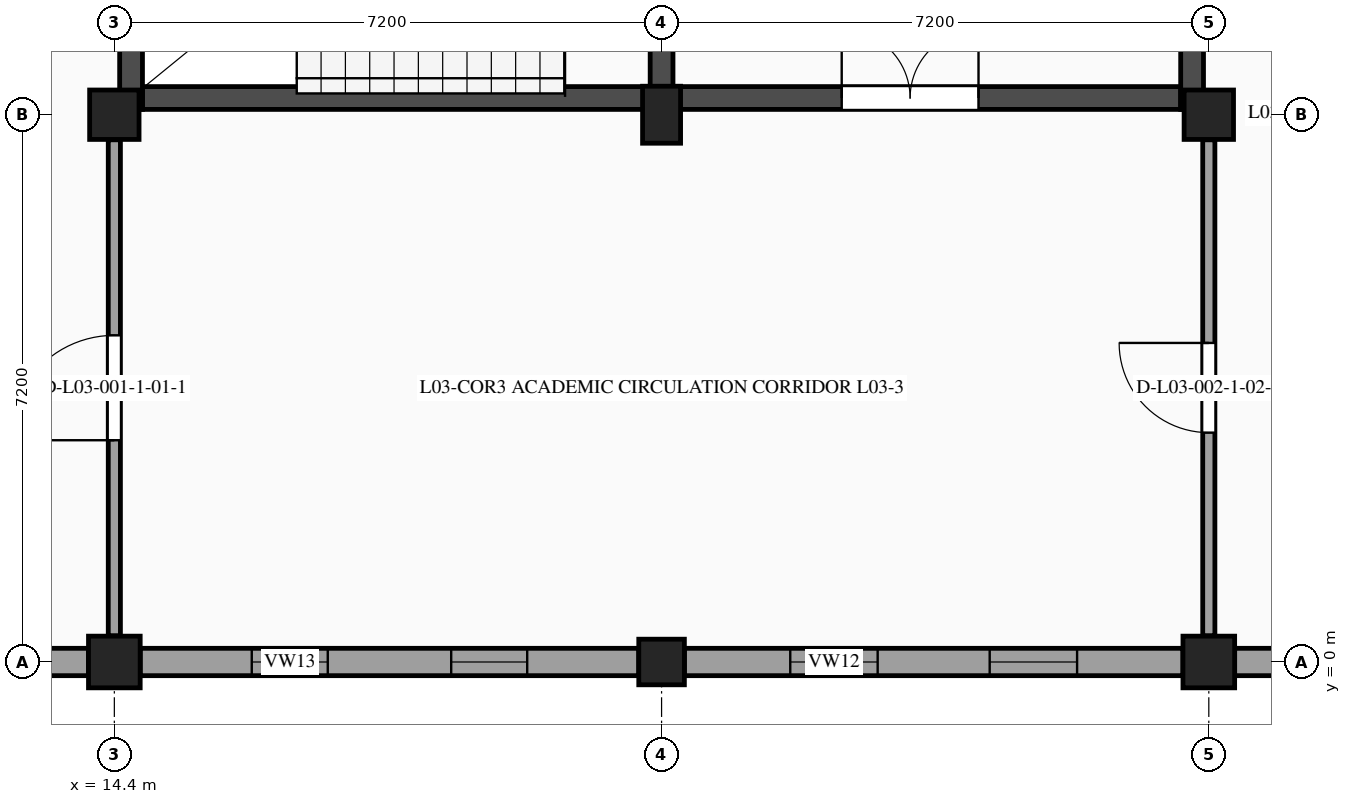
"""IFC4 building model, lengths in metres.
Left out: names, types, materials, properties, quantities, classifications, styles, units other than length and angle.
Written with IfcOpenShell. Run it as: python <this file> out.ifc"""

import sys

from ifc_helpers import new_model, si_unit, direction, frame, frame_2d, origin, origin_2d, place, context, subcontext, project, spatial, rectangle, extrude, element, fill, save


model = new_model("IFC4")
c1 = context("Model", 3, precision=1e-05, world=origin(), true_north=direction((0.0, 1.0)))
c2 = subcontext(c1, "Body", "Model", "MODEL_VIEW")
j1 = project(units=[si_unit("LENGTHUNIT", "METRE"), si_unit("PLANEANGLEUNIT", "RADIAN")], contexts=[c1])
p1 = place(None, origin())
s1 = spatial("IfcSite", under=j1, at=p1, CompositionType="ELEMENT")
p2 = place(p1, origin())
s2 = spatial("IfcBuilding", under=s1, at=p2, CompositionType="ELEMENT")
p3 = place(p2, frame((0.0, 0.0, 14.4)))
s3 = spatial("IfcBuildingStorey", under=s2, at=p3, CompositionType="ELEMENT", Elevation=14.4)
p4 = place(p3, frame((14.4, 0.0, 0.0), z_axis=(0.0, 0.0, 1.0), x_axis=(1.0, 0.0, 0.0)))
e1 = element("IfcColumn", 1, at=p4, inside=s3, PredefinedType="COLUMN", context=c2, shape_type="SweptSolid", body=[
    extrude(rectangle(XDim=0.68, YDim=0.68, at=origin_2d()), origin(), (0.0, 0.0, 1.0), 4.2),
])
p5 = place(p3, frame((14.4, 7.2, 0.0), z_axis=(0.0, 0.0, 1.0), x_axis=(1.0, 0.0, 0.0)))
e2 = element("IfcColumn", 2, at=p5, inside=s3, PredefinedType="COLUMN", context=c2, shape_type="SweptSolid", body=[
    extrude(rectangle(XDim=0.65, YDim=0.65, at=origin_2d()), origin(), (0.0, 0.0, 1.0), 4.2),
])
p6 = place(p3, frame((21.6, 0.0, 0.0), z_axis=(0.0, 0.0, 1.0), x_axis=(1.0, 0.0, 0.0)))
e3 = element("IfcColumn", 3, at=p6, inside=s3, PredefinedType="COLUMN", context=c2, shape_type="SweptSolid", body=[
    extrude(rectangle(XDim=0.6, YDim=0.6, at=origin_2d()), origin(), (0.0, 0.0, 1.0), 4.2),
])
p7 = place(p3, frame((21.6, 7.2, 0.0), z_axis=(0.0, 0.0, 1.0), x_axis=(1.0, 0.0, 0.0)))
e4 = element("IfcColumn", 4, at=p7, inside=s3, PredefinedType="COLUMN", context=c2, shape_type="SweptSolid", body=[
    extrude(rectangle(XDim=0.5, YDim=0.75, at=origin_2d()), origin(), (0.0, 0.0, 1.0), 4.2),
])
p8 = place(p3, frame((28.8, 0.0, 0.0), z_axis=(0.0, 0.0, 1.0), x_axis=(1.0, 0.0, 0.0)))
e5 = element("IfcColumn", 5, at=p8, inside=s3, PredefinedType="COLUMN", context=c2, shape_type="SweptSolid", body=[
    extrude(rectangle(XDim=0.68, YDim=0.68, at=origin_2d()), origin(), (0.0, 0.0, 1.0), 4.2),
])
p9 = place(p3, frame((28.8, 7.2, 0.0), z_axis=(0.0, 0.0, 1.0), x_axis=(1.0, 0.0, 0.0)))
e6 = element("IfcColumn", 6, at=p9, inside=s3, PredefinedType="COLUMN", context=c2, shape_type="SweptSolid", body=[
    extrude(rectangle(XDim=0.65, YDim=0.65, at=origin_2d()), origin(), (0.0, 0.0, 1.0), 4.2),
])
p10 = place(p3, frame((35.7, 0.0, 0.0), z_axis=(0.0, 0.0, 1.0), x_axis=(-1.0, 0.0, 0.0)))
e7 = element("IfcWall", 7, at=p10, inside=s3, PredefinedType="STANDARD", context=c2, shape_type="SweptSolid", body=[
    extrude(rectangle(XDim=6.56, YDim=0.36, at=frame_2d((3.28, 0.0))), origin(), (0.0, 0.0, 1.0), 3.185),
])
p11 = place(p10, frame((1.343, 0.0, 1.15)))
e8 = element("IfcOpeningElement", 8, at=p11, cuts=e7, PredefinedType="OPENING", context=c2, shape_type="SweptSolid", body=[
    extrude(rectangle(XDim=1.25, YDim=1.25, at=frame_2d((0.625, 0.625))), frame((0.0, 0.19, 0.0), z_axis=(0.0, -1.0, 0.0), x_axis=(1.0, 0.0, 0.0)), (0.0, 0.0, 1.0), 0.38),
])
p12 = place(p10, frame((3.967, 0.0, 1.15)))
e9 = element("IfcOpeningElement", 9, at=p12, cuts=e7, PredefinedType="OPENING", context=c2, shape_type="SweptSolid", body=[
    extrude(rectangle(XDim=1.25, YDim=1.25, at=frame_2d((0.625, 0.625))), frame((0.0, 0.19, 0.0), z_axis=(0.0, -1.0, 0.0), x_axis=(1.0, 0.0, 0.0)), (0.0, 0.0, 1.0), 0.38),
])
p13 = place(p3, frame((28.46, 0.0, 0.0), z_axis=(0.0, 0.0, 1.0), x_axis=(-1.0, 0.0, 0.0)))
e10 = element("IfcWall", 10, at=p13, inside=s3, PredefinedType="STANDARD", context=c2, shape_type="SweptSolid", body=[
    extrude(rectangle(XDim=6.56, YDim=0.36, at=frame_2d((3.28, 0.0))), origin(), (0.0, 0.0, 1.0), 3.185),
])
p14 = place(p13, frame((1.393, 0.0, 1.15)))
e11 = element("IfcOpeningElement", 11, at=p14, cuts=e10, PredefinedType="OPENING", context=c2, shape_type="SweptSolid", body=[
    extrude(rectangle(XDim=1.15, YDim=1.2, at=frame_2d((0.575, 0.6))), frame((0.0, 0.19, 0.0), z_axis=(0.0, -1.0, 0.0), x_axis=(1.0, 0.0, 0.0)), (0.0, 0.0, 1.0), 0.38),
])
p15 = place(p13, frame((4.017, 0.0, 1.15)))
e12 = element("IfcOpeningElement", 12, at=p15, cuts=e10, PredefinedType="OPENING", context=c2, shape_type="SweptSolid", body=[
    extrude(rectangle(XDim=1.15, YDim=1.2, at=frame_2d((0.575, 0.6))), frame((0.0, 0.19, 0.0), z_axis=(0.0, -1.0, 0.0), x_axis=(1.0, 0.0, 0.0)), (0.0, 0.0, 1.0), 0.38),
])
p16 = place(p3, frame((21.3, 0.0, 0.0), z_axis=(0.0, 0.0, 1.0), x_axis=(-1.0, 0.0, 0.0)))
e13 = element("IfcWall", 13, at=p16, inside=s3, PredefinedType="STANDARD", context=c2, shape_type="SweptSolid", body=[
    extrude(rectangle(XDim=6.56, YDim=0.36, at=frame_2d((3.28, 0.0))), origin(), (0.0, 0.0, 1.0), 3.185),
])
p17 = place(p16, frame((1.468, 0.0, 1.15)))
e14 = element("IfcOpeningElement", 14, at=p17, cuts=e13, PredefinedType="OPENING", context=c2, shape_type="SweptSolid", body=[
    extrude(rectangle(XDim=1.0, YDim=1.2, at=frame_2d((0.5, 0.6))), frame((0.0, 0.19, 0.0), z_axis=(0.0, -1.0, 0.0), x_axis=(1.0, 0.0, 0.0)), (0.0, 0.0, 1.0), 0.38),
])
p18 = place(p16, frame((4.092, 0.0, 1.15)))
e15 = element("IfcOpeningElement", 15, at=p18, cuts=e13, PredefinedType="OPENING", context=c2, shape_type="SweptSolid", body=[
    extrude(rectangle(XDim=1.0, YDim=1.2, at=frame_2d((0.5, 0.6))), frame((0.0, 0.19, 0.0), z_axis=(0.0, -1.0, 0.0), x_axis=(1.0, 0.0, 0.0)), (0.0, 0.0, 1.0), 0.38),
])
p19 = place(p3, frame((14.06, 0.0, 0.0), z_axis=(0.0, 0.0, 1.0), x_axis=(-1.0, 0.0, 0.0)))
e16 = element("IfcWall", 16, at=p19, inside=s3, PredefinedType="STANDARD", context=c2, shape_type="SweptSolid", body=[
    extrude(rectangle(XDim=6.56, YDim=0.36, at=frame_2d((3.28, 0.0))), origin(), (0.0, 0.0, 1.0), 3.185),
])
p20 = place(p19, frame((1.543, 0.0, 1.15)))
e17 = element("IfcOpeningElement", 17, at=p20, cuts=e16, PredefinedType="OPENING", context=c2, shape_type="SweptSolid", body=[
    extrude(rectangle(XDim=0.85, YDim=1.25, at=frame_2d((0.425, 0.625))), frame((0.0, 0.19, 0.0), z_axis=(0.0, -1.0, 0.0), x_axis=(1.0, 0.0, 0.0)), (0.0, 0.0, 1.0), 0.38),
])
p21 = place(p19, frame((4.167, 0.0, 1.15)))
e18 = element("IfcOpeningElement", 18, at=p21, cuts=e16, PredefinedType="OPENING", context=c2, shape_type="SweptSolid", body=[
    extrude(rectangle(XDim=0.85, YDim=1.25, at=frame_2d((0.425, 0.625))), frame((0.0, 0.19, 0.0), z_axis=(0.0, -1.0, 0.0), x_axis=(1.0, 0.0, 0.0)), (0.0, 0.0, 1.0), 0.38),
])
p22 = place(p3, frame((14.77, 7.42, 0.0), z_axis=(0.0, 0.0, 1.0), x_axis=(1.0, 0.0, 0.0)))
e19 = element("IfcWall", 19, at=p22, inside=s3, PredefinedType="SHEAR", context=c2, shape_type="SweptSolid", body=[
    extrude(rectangle(XDim=6.68, YDim=0.3, at=frame_2d((3.34, 0.0))), origin(), (0.0, 0.0, 1.0), 3.94),
])
p23 = place(p3, frame((14.62, 14.33, 0.0), z_axis=(0.0, 0.0, 1.0), x_axis=(0.0, -1.0, 0.0)))
e20 = element("IfcWall", 20, at=p23, inside=s3, PredefinedType="SHEAR", context=c2, shape_type="SweptSolid", body=[
    extrude(rectangle(XDim=7.06, YDim=0.3, at=frame_2d((3.53, 0.0))), origin(), (0.0, 0.0, 1.0), 3.94),
])
p24 = place(p3, frame((21.6, 7.27, 0.0), z_axis=(0.0, 0.0, 1.0), x_axis=(0.0, 1.0, 0.0)))
e21 = element("IfcWall", 21, at=p24, inside=s3, PredefinedType="SHEAR", context=c2, shape_type="SweptSolid", body=[
    extrude(rectangle(XDim=7.06, YDim=0.3, at=frame_2d((3.53, 0.0))), origin(), (0.0, 0.0, 1.0), 3.94),
])
p25 = place(p24, frame((1.4, 0.0, 0.0)))
e22 = element("IfcOpeningElement", 22, at=p25, cuts=e21, PredefinedType="OPENING", context=c2, shape_type="SweptSolid", body=[
    extrude(rectangle(XDim=1.8, YDim=2.2, at=frame_2d((0.9, 1.1))), frame((0.0, 0.16, 0.0), z_axis=(0.0, -1.0, 0.0), x_axis=(1.0, 0.0, 0.0)), (0.0, 0.0, 1.0), 0.32),
])
p26 = place(p3, frame((21.75, 7.42, 0.0), z_axis=(0.0, 0.0, 1.0), x_axis=(1.0, 0.0, 0.0)))
e23 = element("IfcWall", 23, at=p26, inside=s3, PredefinedType="SHEAR", context=c2, shape_type="SweptSolid", body=[
    extrude(rectangle(XDim=6.68, YDim=0.3, at=frame_2d((3.34, 0.0))), origin(), (0.0, 0.0, 1.0), 3.94),
])
p27 = place(p26, frame((2.22, 0.0, 0.0)))
e24 = element("IfcOpeningElement", 24, at=p27, cuts=e23, PredefinedType="OPENING", context=c2, shape_type="SweptSolid", body=[
    extrude(rectangle(XDim=1.8, YDim=2.2, at=frame_2d((0.9, 1.1))), frame((0.0, 0.16, 0.0), z_axis=(0.0, -1.0, 0.0), x_axis=(1.0, 0.0, 0.0)), (0.0, 0.0, 1.0), 0.32),
])
p28 = place(p3, frame((28.58, 7.27, 0.0), z_axis=(0.0, 0.0, 1.0), x_axis=(0.0, 1.0, 0.0)))
e25 = element("IfcWall", 25, at=p28, inside=s3, PredefinedType="SHEAR", context=c2, shape_type="SweptSolid", body=[
    extrude(rectangle(XDim=7.06, YDim=0.3, at=frame_2d((3.53, 0.0))), origin(), (0.0, 0.0, 1.0), 3.94),
])
p29 = place(p3, frame((14.4, 0.345, 0.0), z_axis=(0.0, 0.0, 1.0), x_axis=(0.0, 1.0, 0.0)))
e26 = element("IfcWall", 26, at=p29, inside=s3, PredefinedType="PARTITIONING", context=c2, shape_type="SweptSolid", body=[
    extrude(rectangle(XDim=6.525, YDim=0.16, at=frame_2d((3.263, 0.0))), origin(), (0.0, 0.0, 1.0), 3.25),
])
p30 = place(p29, frame((2.573, 0.0, 0.0)))
e27 = element("IfcOpeningElement", 27, at=p30, cuts=e26, PredefinedType="OPENING", context=c2, shape_type="SweptSolid", body=[
    extrude(rectangle(XDim=1.38, YDim=2.22, at=frame_2d((0.69, 1.11))), frame((0.0, 0.09, 0.0), z_axis=(0.0, -1.0, 0.0), x_axis=(1.0, 0.0, 0.0)), (0.0, 0.0, 1.0), 0.18),
])
p31 = place(p3, frame((28.8, 0.345, 0.0), z_axis=(0.0, 0.0, 1.0), x_axis=(0.0, 1.0, 0.0)))
e28 = element("IfcWall", 28, at=p31, inside=s3, PredefinedType="PARTITIONING", context=c2, shape_type="SweptSolid", body=[
    extrude(rectangle(XDim=6.525, YDim=0.16, at=frame_2d((3.263, 0.0))), origin(), (0.0, 0.0, 1.0), 3.25),
])
p32 = place(p31, frame((2.673, 0.0, 0.0)))
e29 = element("IfcOpeningElement", 29, at=p32, cuts=e28, PredefinedType="OPENING", context=c2, shape_type="SweptSolid", body=[
    extrude(rectangle(XDim=1.18, YDim=2.18, at=frame_2d((0.59, 1.09))), frame((0.0, 0.09, 0.0), z_axis=(0.0, -1.0, 0.0), x_axis=(1.0, 0.0, 0.0)), (0.0, 0.0, 1.0), 0.18),
])
p33 = place(p14, origin())
e30 = element("IfcWindow", 30, at=p33, inside=s3, PartitioningType="SINGLE_PANEL", PredefinedType="WINDOW", context=c2, shape_type="SweptSolid", body=[
    extrude(rectangle(XDim=1.15, YDim=1.2, at=frame_2d((0.575, 0.6))), frame((0.0, -0.08, 0.0), z_axis=(0.0, -1.0, 0.0), x_axis=(1.0, 0.0, 0.0)), (0.0, 0.0, 1.0), 0.06),
])
fill(e11, e30)
p34 = place(p15, origin())
e31 = element("IfcWindow", 31, at=p34, inside=s3, PartitioningType="SINGLE_PANEL", PredefinedType="WINDOW", context=c2, shape_type="SweptSolid", body=[
    extrude(rectangle(XDim=1.15, YDim=1.2, at=frame_2d((0.575, 0.6))), frame((0.0, -0.08, 0.0), z_axis=(0.0, -1.0, 0.0), x_axis=(1.0, 0.0, 0.0)), (0.0, 0.0, 1.0), 0.06),
])
fill(e12, e31)
p35 = place(p17, origin())
e32 = element("IfcWindow", 32, at=p35, inside=s3, PartitioningType="SINGLE_PANEL", PredefinedType="WINDOW", context=c2, shape_type="SweptSolid", body=[
    extrude(rectangle(XDim=1.0, YDim=1.2, at=frame_2d((0.5, 0.6))), frame((0.0, -0.08, 0.0), z_axis=(0.0, -1.0, 0.0), x_axis=(1.0, 0.0, 0.0)), (0.0, 0.0, 1.0), 0.06),
])
fill(e14, e32)
p36 = place(p18, origin())
e33 = element("IfcWindow", 33, at=p36, inside=s3, PartitioningType="SINGLE_PANEL", PredefinedType="WINDOW", context=c2, shape_type="SweptSolid", body=[
    extrude(rectangle(XDim=1.0, YDim=1.2, at=frame_2d((0.5, 0.6))), frame((0.0, -0.08, 0.0), z_axis=(0.0, -1.0, 0.0), x_axis=(1.0, 0.0, 0.0)), (0.0, 0.0, 1.0), 0.06),
])
fill(e15, e33)
p37 = place(p27, origin())
e34 = element("IfcDoor", 34, at=p37, inside=s3, OperationType="DOUBLE_DOOR_SINGLE_SWING", PredefinedType="DOOR", context=c2, shape_type="SweptSolid", body=[
    extrude(rectangle(XDim=1.8, YDim=2.2, at=frame_2d((0.9, 1.1))), frame((0.0, 0.025, 0.0), z_axis=(0.0, -1.0, 0.0), x_axis=(1.0, 0.0, 0.0)), (0.0, 0.0, 1.0), 0.05),
])
fill(e24, e34)
p38 = place(p30, origin())
e35 = element("IfcDoor", 35, at=p38, inside=s3, OperationType="SINGLE_SWING_LEFT", PredefinedType="DOOR", context=c2, shape_type="SweptSolid", body=[
    extrude(rectangle(XDim=1.38, YDim=2.22, at=frame_2d((0.69, 1.11))), frame((0.0, 0.025, 0.0), z_axis=(0.0, -1.0, 0.0), x_axis=(1.0, 0.0, 0.0)), (0.0, 0.0, 1.0), 0.05),
])
fill(e27, e35)
p39 = place(p32, origin())
e36 = element("IfcDoor", 36, at=p39, inside=s3, OperationType="SINGLE_SWING_RIGHT", PredefinedType="DOOR", context=c2, shape_type="SweptSolid", body=[
    extrude(rectangle(XDim=1.18, YDim=2.18, at=frame_2d((0.59, 1.09))), frame((0.0, 0.025, 0.0), z_axis=(0.0, -1.0, 0.0), x_axis=(1.0, 0.0, 0.0)), (0.0, 0.0, 1.0), 0.05),
])
fill(e29, e36)
save(model, sys.argv[1])
